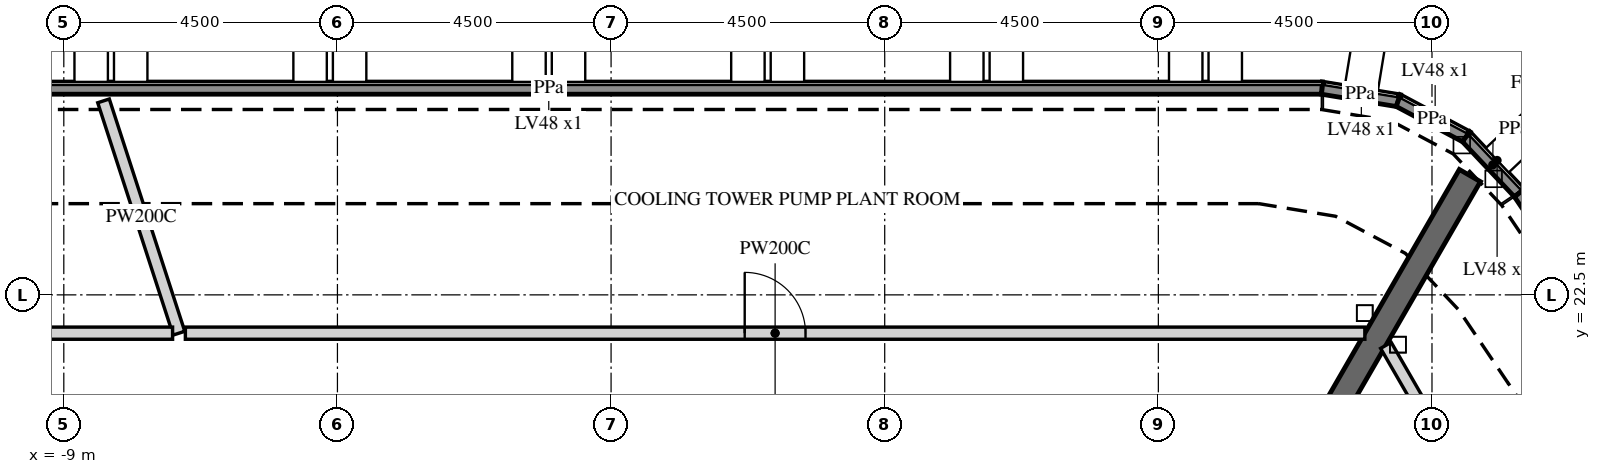
"""IFC4 building model, lengths in metres.
Left out: names, types, materials, properties, quantities, classifications, styles, units other than length and angle.
Written with IfcOpenShell. Run it as: python <this file> out.ifc"""

import sys

from ifc_helpers import new_model, si_unit, direction, frame, frame_2d, origin, place, context, subcontext, project, spatial, polyline, rectangle, outline, extrude, element, fill, save


model = new_model("IFC4")
c1 = context("Model", 3, precision=1e-05, world=origin(), true_north=direction((0.0, 1.0)))
c2 = subcontext(c1, "Body", "Model", "MODEL_VIEW")
j1 = project(units=[si_unit("LENGTHUNIT", "METRE"), si_unit("PLANEANGLEUNIT", "RADIAN")], contexts=[c1])
p1 = place(None, origin())
s1 = spatial("IfcSite", under=j1, at=p1, CompositionType="ELEMENT")
p2 = place(p1, origin())
s2 = spatial("IfcBuilding", under=s1, at=p2, CompositionType="ELEMENT")
p3 = place(p2, frame((0.0, 0.0, 343.5)))
s3 = spatial("IfcBuildingStorey", under=s2, at=p3, CompositionType="ELEMENT", Elevation=343.5)
p4 = place(p3, frame((11.689, 25.9, 5.7), z_axis=(0.0, 0.0, 1.0), x_axis=(0.9867748983, -0.162096576412, 0.0)))
e1 = element("IfcWall", 1, at=p4, inside=s3, PredefinedType="PARAPET", context=c2, shape_type="SweptSolid", body=[
    extrude(outline(polyline([(0.008, -0.1), (1.256, -0.1), (1.289, 0.1), (-0.008, 0.1), (0.008, -0.1)])), origin(), (0.0, 0.0, 1.0), 1.1),
])
p5 = place(p3, frame((12.945, 25.694, 5.7), z_axis=(0.0, 0.0, 1.0), x_axis=(0.882950708751, -0.469465702598, 0.0)))
e2 = element("IfcWall", 2, at=p5, inside=s3, PredefinedType="PARAPET", context=c2, shape_type="SweptSolid", body=[
    extrude(outline(polyline([(0.016, -0.1), (1.248, -0.1), (1.281, 0.1), (-0.016, 0.1), (0.016, -0.1)])), origin(), (0.0, 0.0, 1.0), 1.1),
])
p6 = place(p3, frame((14.062, 25.1, 5.7), z_axis=(0.0, 0.0, 1.0), x_axis=(0.686184039693, -0.727427978339, 0.0)))
e3 = element("IfcWall", 3, at=p6, inside=s3, PredefinedType="PARAPET", context=c2, shape_type="SweptSolid", body=[
    extrude(outline(polyline([(0.016, -0.1), (1.265, -0.1), (1.281, 0.1), (-0.016, 0.1), (0.016, -0.1)])), origin(), (0.0, 0.0, 1.0), 1.1),
])
p7 = place(p3, frame((14.935, 24.174, 5.7), z_axis=(0.0, 0.0, 1.0), x_axis=(0.559194464979, -0.829036519302, 0.0)))
e4 = element("IfcWall", 4, at=p7, inside=s3, PredefinedType="PARAPET", context=c2, shape_type="SweptSolid", body=[
    extrude(outline(polyline([(0.008, -0.1), (25.418, -0.1), (25.437, 0.1), (-0.008, 0.1), (0.008, -0.1)])), origin(), (0.0, 0.0, 1.0), 1.1),
])
p8 = place(p3, frame((-13.738, 25.9, 5.7), z_axis=(0.0, 0.0, 1.0), x_axis=(1.0, 0.0, 0.0)))
e5 = element("IfcWall", 5, at=p8, inside=s3, PredefinedType="PARAPET", context=c2, shape_type="SweptSolid", body=[
    extrude(outline(polyline([(0.009, -0.1), (25.419, -0.1), (25.435, 0.1), (-0.009, 0.1), (0.009, -0.1)])), origin(), (0.0, 0.0, 1.0), 1.1),
])
p9 = place(p3, frame((6.351, 11.0, -0.3), z_axis=(0.0, 0.0, 1.0), x_axis=(0.499998894578, 0.866026041999, 0.0)))
e6 = element("IfcWall", 6, at=p9, inside=s3, PredefinedType="SHEAR", context=c2, shape_type="SweptSolid", body=[
    extrude(rectangle(XDim=15.544, YDim=0.4, at=frame_2d((7.772, 0.0))), origin(), (0.0, 0.0, 1.0), 5.8),
])
p10 = place(p9, frame((6.872, 0.0, 0.3)))
e7 = element("IfcOpeningElement", 7, at=p10, cuts=e6, PredefinedType="OPENING", context=c2, shape_type="SweptSolid", body=[
    extrude(rectangle(XDim=1.8, YDim=2.4, at=frame_2d((0.9, 1.2))), frame((0.0, 0.21, 0.0), z_axis=(0.0, -1.0, 0.0), x_axis=(1.0, 0.0, 0.0)), (0.0, 0.0, 1.0), 0.42),
])
p11 = place(p3, frame((-8.347, 25.69, 0.0), z_axis=(0.0, 0.0, 1.0), x_axis=(0.308906015955, -0.951092568211, 0.0)))
e8 = element("IfcWall", 8, at=p11, inside=s3, PredefinedType="PARTITIONING", context=c2, shape_type="SweptSolid", body=[
    extrude(rectangle(XDim=4.017, YDim=0.2, at=frame_2d((2.008, 0.0))), origin(), (0.0, 0.0, 1.0), 5.5),
])
p12 = place(p3, frame((-7.211, 21.87, 0.0), z_axis=(0.0, 0.0, 1.0), x_axis=(-1.0, 0.0, 0.0)))
e9 = element("IfcWall", 9, at=p12, inside=s3, PredefinedType="PARTITIONING", context=c2, shape_type="SweptSolid", body=[
    extrude(rectangle(XDim=5.3, YDim=0.2, at=frame_2d((2.65, 0.0))), origin(), (0.0, 0.0, 1.0), 5.5),
])
p13 = place(p3, frame((-7.001, 21.87, 0.0), z_axis=(0.0, 0.0, 1.0), x_axis=(1.0, 0.0, 0.0)))
e10 = element("IfcWall", 10, at=p13, inside=s3, PredefinedType="PARTITIONING", context=c2, shape_type="SweptSolid", body=[
    extrude(rectangle(XDim=19.397, YDim=0.2, at=frame_2d((9.698, 0.0))), origin(), (0.0, 0.0, 1.0), 5.5),
])
p14 = place(p13, frame((9.198, 0.0, 0.0)))
e11 = element("IfcOpeningElement", 11, at=p14, cuts=e10, PredefinedType="OPENING", context=c2, shape_type="SweptSolid", body=[
    extrude(rectangle(XDim=1.0, YDim=2.1, at=frame_2d((0.5, 1.05))), frame((0.0, 0.11, 0.0), z_axis=(0.0, -1.0, 0.0), x_axis=(1.0, 0.0, 0.0)), (0.0, 0.0, 1.0), 0.22),
])
p15 = place(p3, frame((12.742, 21.67, 0.0), z_axis=(0.0, 0.0, 1.0), x_axis=(0.500013422481, -0.866017654173, 0.0)))
e12 = element("IfcWall", 12, at=p15, inside=s3, PredefinedType="PARTITIONING", context=c2, shape_type="SweptSolid", body=[
    extrude(rectangle(XDim=12.396, YDim=0.2, at=frame_2d((6.198, 0.0))), origin(), (0.0, 0.0, 1.0), 4.573),
])
p16 = place(p15, frame((5.698, 0.0, 0.0)))
e13 = element("IfcOpeningElement", 13, at=p16, cuts=e12, PredefinedType="OPENING", context=c2, shape_type="SweptSolid", body=[
    extrude(rectangle(XDim=1.0, YDim=2.1, at=frame_2d((0.5, 1.05))), frame((0.0, 0.11, 0.0), z_axis=(0.0, -1.0, 0.0), x_axis=(1.0, 0.0, 0.0)), (0.0, 0.0, 1.0), 0.22),
])
p17 = place(p14, origin())
e14 = element("IfcDoor", 14, at=p17, inside=s3, OperationType="SINGLE_SWING_RIGHT", PredefinedType="DOOR", context=c2, shape_type="SweptSolid", body=[
    extrude(rectangle(XDim=1.0, YDim=2.1, at=frame_2d((0.5, 1.05))), frame((0.0, 0.025, 0.0), z_axis=(0.0, -1.0, 0.0), x_axis=(1.0, 0.0, 0.0)), (0.0, 0.0, 1.0), 0.05),
])
fill(e11, e14)
save(model, sys.argv[1])
